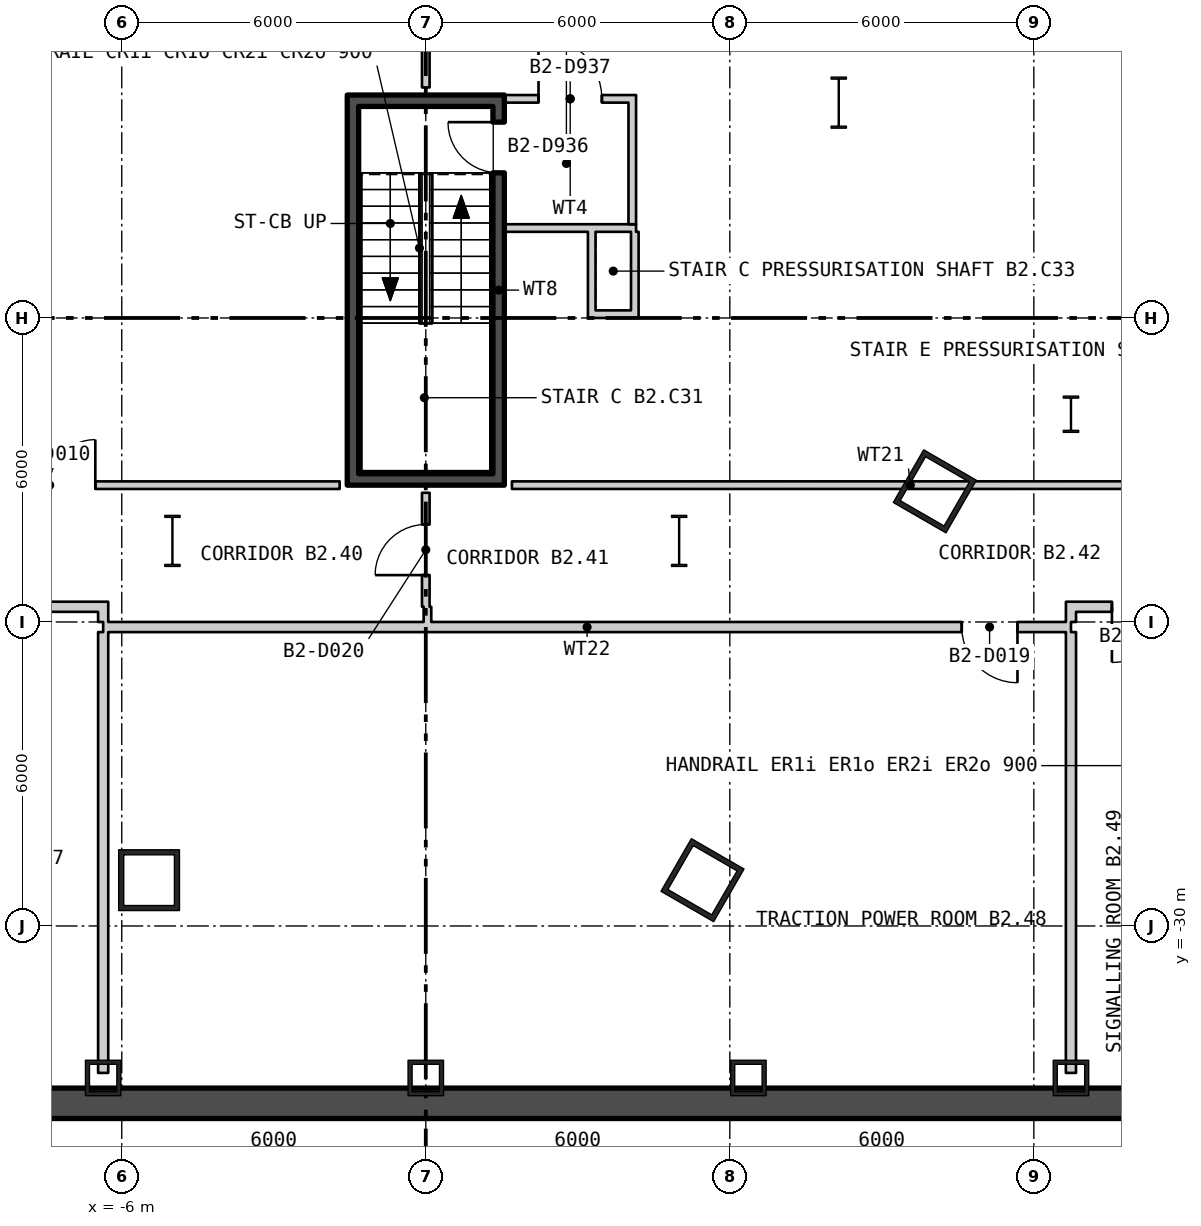
"""IFC4 building model, lengths in metres.
Left out: names, types, materials, properties, quantities, classifications, styles, units other than length and angle.
Written with IfcOpenShell. Run it as: python <this file> out.ifc"""

import sys

from ifc_helpers import new_model, si_unit, direction, frame, frame_2d, origin, origin_2d, place, context, subcontext, project, spatial, rectangle, hollow_rectangle, i_section, extrude, element, fill, save


model = new_model("IFC4")
c1 = context("Model", 3, precision=1e-05, world=origin(), true_north=direction((0.0, 1.0)))
c2 = subcontext(c1, "Body", "Model", "MODEL_VIEW")
j1 = project(units=[si_unit("LENGTHUNIT", "METRE"), si_unit("PLANEANGLEUNIT", "RADIAN")], contexts=[c1])
p1 = place(None, origin())
s1 = spatial("IfcSite", under=j1, at=p1, CompositionType="ELEMENT")
p2 = place(p1, origin())
s2 = spatial("IfcBuilding", under=s1, at=p2, CompositionType="ELEMENT")
p3 = place(p2, frame((0.0, 0.0, -11.4)))
s3 = spatial("IfcBuildingStorey", under=s2, at=p3, CompositionType="ELEMENT", Elevation=-11.4)
for number, where, z_axis, x_axis in (
    (1, (-5.461, -29.096, 0.0), (0.0, 0.0, 1.0), (1.0, 0.0, 0.0)),
    (2, (5.461, -29.096, 0.0), (0.0, 0.0, 1.0), (0.5, 0.866, 0.0)),
    (3, (10.046, -21.422, 0.0), (0.0, 0.0, 1.0), (0.5, 0.866, 0.0)),
):
    element("IfcColumn", number, at=place(p3, frame(where, z_axis=z_axis, x_axis=x_axis)), inside=s3, PredefinedType="COLUMN", context=c2, shape_type="SweptSolid", body=[
        extrude(hollow_rectangle(XDim=1.2, YDim=1.2, WallThickness=0.1, at=origin_2d()), origin(), (0.0, 0.0, 1.0), 5.7),
    ])
for number, where, z_axis, x_axis in (
    (4, (8.15, -13.75, 0.0), (0.0, 0.0, 1.0), (1.0, 0.0, 0.0)),
    (5, (5.0, -22.4, 0.0), (0.0, 0.0, 1.0), (1.0, 0.0, 0.0)),
    (6, (-5.0, -22.4, 0.0), (0.0, 0.0, 1.0), (1.0, 0.0, 0.0)),
):
    element("IfcColumn", number, at=place(p3, frame(where, z_axis=z_axis, x_axis=x_axis)), inside=s3, PredefinedType="COLUMN", context=c2, shape_type="SweptSolid", body=[
        extrude(i_section(OverallWidth=0.302, OverallDepth=1.008, WebThickness=0.021, FlangeThickness=0.04, at=origin_2d()), origin(), (0.0, 0.0, 1.0), 5.7),
    ])
for number, where, z_axis, x_axis in (
    (7, (-6.367, -33.0, 0.0), (0.0, 0.0, 1.0), (1.0, 0.0, 0.0)),
    (8, (0.0, -33.0, 0.0), (0.0, 0.0, 1.0), (1.0, 0.0, 0.0)),
    (9, (6.367, -33.0, 0.0), (0.0, 0.0, 1.0), (1.0, 0.0, 0.0)),
    (10, (12.733, -33.0, 0.0), (0.0, 0.0, 1.0), (1.0, 0.0, 0.0)),
):
    element("IfcColumn", number, at=place(p3, frame(where, z_axis=z_axis, x_axis=x_axis)), inside=s3, PredefinedType="COLUMN", context=c2, shape_type="SweptSolid", body=[
        extrude(hollow_rectangle(XDim=0.7, YDim=0.7, WallThickness=0.08, at=origin_2d()), origin(), (0.0, 0.0, 1.0), 5.7),
    ])
p4 = place(p3, frame((12.733, -19.9, 0.0), z_axis=(0.0, 0.0, 1.0), x_axis=(1.0, 0.0, 0.0)))
e11 = element("IfcColumn", 11, at=p4, inside=s3, PredefinedType="COLUMN", context=c2, shape_type="SweptSolid", body=[
    extrude(i_section(OverallWidth=0.304, OverallDepth=0.716, WebThickness=0.021, FlangeThickness=0.04, at=origin_2d()), origin(), (0.0, 0.0, 1.0), 5.7),
])
p5 = place(p3, frame((-39.0, -33.5, -0.4), z_axis=(0.0, 0.0, 1.0), x_axis=(1.0, 0.0, 0.0)))
e12 = element("IfcWall", 12, at=p5, inside=s3, PredefinedType="STANDARD", context=c2, shape_type="SweptSolid", body=[
    extrude(rectangle(XDim=78.0, YDim=0.6, at=frame_2d((39.0, 0.0))), origin(), (0.0, 0.0, 1.0), 5.7),
])
p6 = place(p3, frame((-1.438, -21.075, 0.0), z_axis=(0.0, 0.0, 1.0), x_axis=(0.0, 1.0, 0.0)))
e13 = element("IfcWall", 13, at=p6, inside=s3, PredefinedType="SHEAR", context=c2, shape_type="SweptSolid", body=[
    extrude(rectangle(XDim=7.25, YDim=0.225, at=frame_2d((3.625, 0.0))), origin(), (0.0, 0.0, 1.0), 5.25),
])
p7 = place(p3, frame((1.438, -21.075, 0.0), z_axis=(0.0, 0.0, 1.0), x_axis=(0.0, 1.0, 0.0)))
e14 = element("IfcWall", 14, at=p7, inside=s3, PredefinedType="SHEAR", context=c2, shape_type="SweptSolid", body=[
    extrude(rectangle(XDim=7.25, YDim=0.225, at=frame_2d((3.625, 0.0))), origin(), (0.0, 0.0, 1.0), 5.25),
])
p8 = place(p7, frame((5.94, 0.0, 0.0)))
e15 = element("IfcOpeningElement", 15, at=p8, cuts=e14, PredefinedType="OPENING", context=c2, shape_type="SweptSolid", body=[
    extrude(rectangle(XDim=1.0, YDim=2.1, at=frame_2d((0.5, 1.05))), frame((0.0, 0.122, 0.0), z_axis=(0.0, -1.0, 0.0), x_axis=(1.0, 0.0, 0.0)), (0.0, 0.0, 1.0), 0.245),
])
for number, where, z_axis, x_axis in (
    (16, (-1.55, -21.188, 0.0), (0.0, 0.0, 1.0), (1.0, 0.0, 0.0)),
    (17, (-1.55, -13.713, 0.0), (0.0, 0.0, 1.0), (1.0, 0.0, 0.0)),
):
    element("IfcWall", number, at=place(p3, frame(where, z_axis=z_axis, x_axis=x_axis)), inside=s3, PredefinedType="SHEAR", context=c2, shape_type="SweptSolid", body=[
        extrude(rectangle(XDim=3.1, YDim=0.225, at=frame_2d((1.55, 0.0))), origin(), (0.0, 0.0, 1.0), 5.25),
    ])
p9 = place(p3, frame((1.55, -16.225, 0.0), z_axis=(0.0, 0.0, 1.0), x_axis=(1.0, 0.0, 0.0)))
e18 = element("IfcWall", 18, at=p9, inside=s3, PredefinedType="PARTITIONING", context=c2, shape_type="SweptSolid", body=[
    extrude(rectangle(XDim=2.6, YDim=0.15, at=frame_2d((1.3, 0.0))), origin(), (0.0, 0.0, 1.0), 5.25),
])
p10 = place(p3, frame((4.075, -16.15, 0.0), z_axis=(0.0, 0.0, 1.0), x_axis=(0.0, 1.0, 0.0)))
e19 = element("IfcWall", 19, at=p10, inside=s3, PredefinedType="PARTITIONING", context=c2, shape_type="SweptSolid", body=[
    extrude(rectangle(XDim=2.4, YDim=0.15, at=frame_2d((1.2, 0.0))), origin(), (0.0, 0.0, 1.0), 5.25),
])
p11 = place(p3, frame((1.55, -13.675, 0.0), z_axis=(0.0, 0.0, 1.0), x_axis=(1.0, 0.0, 0.0)))
e20 = element("IfcWall", 20, at=p11, inside=s3, PredefinedType="PARTITIONING", context=c2, shape_type="SweptSolid", body=[
    extrude(rectangle(XDim=2.6, YDim=0.15, at=frame_2d((1.3, 0.0))), origin(), (0.0, 0.0, 1.0), 5.25),
])
p12 = place(p11, frame((0.675, 0.0, 0.0)))
e21 = element("IfcOpeningElement", 21, at=p12, cuts=e20, PredefinedType="OPENING", context=c2, shape_type="SweptSolid", body=[
    extrude(rectangle(XDim=1.25, YDim=2.1, at=frame_2d((0.625, 1.05))), frame((0.0, 0.085, 0.0), z_axis=(0.0, -1.0, 0.0), x_axis=(1.0, 0.0, 0.0)), (0.0, 0.0, 1.0), 0.17),
])
p13 = place(p3, frame((3.275, -18.0, 0.0), z_axis=(0.0, 0.0, 1.0), x_axis=(0.0, 1.0, 0.0)))
e22 = element("IfcWall", 22, at=p13, inside=s3, PredefinedType="PARTITIONING", context=c2, shape_type="SweptSolid", body=[
    extrude(rectangle(XDim=1.7, YDim=0.15, at=frame_2d((0.85, 0.0))), origin(), (0.0, 0.0, 1.0), 5.25),
])
p14 = place(p3, frame((3.35, -17.925, 0.0), z_axis=(0.0, 0.0, 1.0), x_axis=(1.0, 0.0, 0.0)))
e23 = element("IfcWall", 23, at=p14, inside=s3, PredefinedType="PARTITIONING", context=c2, shape_type="SweptSolid", body=[
    extrude(rectangle(XDim=0.7, YDim=0.15, at=frame_2d((0.35, 0.0))), origin(), (0.0, 0.0, 1.0), 5.25),
])
p15 = place(p3, frame((4.125, -18.0, 0.0), z_axis=(0.0, 0.0, 1.0), x_axis=(0.0, 1.0, 0.0)))
e24 = element("IfcWall", 24, at=p15, inside=s3, PredefinedType="PARTITIONING", context=c2, shape_type="SweptSolid", body=[
    extrude(rectangle(XDim=1.7, YDim=0.15, at=frame_2d((0.85, 0.0))), origin(), (0.0, 0.0, 1.0), 5.25),
])
p16 = place(p3, frame((-17.425, -21.3, 0.0), z_axis=(0.0, 0.0, 1.0), x_axis=(1.0, 0.0, 0.0)))
e25 = element("IfcWall", 25, at=p16, inside=s3, PredefinedType="PARTITIONING", context=c2, shape_type="SweptSolid", body=[
    extrude(rectangle(XDim=15.725, YDim=0.15, at=frame_2d((7.862, 0.0))), origin(), (0.0, 0.0, 1.0), 5.25),
])
p17 = place(p16, frame((9.103, 0.0, 0.0)))
e26 = element("IfcOpeningElement", 26, at=p17, cuts=e25, PredefinedType="OPENING", context=c2, shape_type="SweptSolid", body=[
    extrude(rectangle(XDim=1.8, YDim=2.1, at=frame_2d((0.9, 1.05))), frame((0.0, 0.085, 0.0), z_axis=(0.0, -1.0, 0.0), x_axis=(1.0, 0.0, 0.0)), (0.0, 0.0, 1.0), 0.17),
])
p18 = place(p3, frame((-12.633, -23.7, 0.0), z_axis=(0.0, 0.0, 1.0), x_axis=(1.0, 0.0, 0.0)))
e27 = element("IfcWall", 27, at=p18, inside=s3, PredefinedType="PARTITIONING", context=c2, shape_type="SweptSolid", body=[
    extrude(rectangle(XDim=6.166, YDim=0.2, at=frame_2d((3.083, 0.0))), origin(), (0.0, 0.0, 1.0), 5.25),
])
p19 = place(p18, frame((3.311, 0.0, 0.0)))
e28 = element("IfcOpeningElement", 28, at=p19, cuts=e27, PredefinedType="OPENING", context=c2, shape_type="SweptSolid", body=[
    extrude(rectangle(XDim=1.1, YDim=2.1, at=frame_2d((0.55, 1.05))), frame((0.0, 0.11, 0.0), z_axis=(0.0, -1.0, 0.0), x_axis=(1.0, 0.0, 0.0)), (0.0, 0.0, 1.0), 0.22),
])
p20 = place(p3, frame((-6.367, -32.9, 0.0), z_axis=(0.0, 0.0, 1.0), x_axis=(0.0, 1.0, 0.0)))
e29 = element("IfcWall", 29, at=p20, inside=s3, PredefinedType="PARTITIONING", context=c2, shape_type="SweptSolid", body=[
    extrude(rectangle(XDim=8.7, YDim=0.2, at=frame_2d((4.35, 0.0))), origin(), (0.0, 0.0, 1.0), 5.25),
])
p21 = place(p3, frame((-6.367, -24.1, 0.0), z_axis=(0.0, 0.0, 1.0), x_axis=(1.0, 0.0, 0.0)))
e30 = element("IfcWall", 30, at=p21, inside=s3, PredefinedType="PARTITIONING", context=c2, shape_type="SweptSolid", body=[
    extrude(rectangle(XDim=19.1, YDim=0.2, at=frame_2d((9.55, 0.0))), origin(), (0.0, 0.0, 1.0), 5.25),
])
p22 = place(p21, frame((16.944, 0.0, 0.0)))
e31 = element("IfcOpeningElement", 31, at=p22, cuts=e30, PredefinedType="OPENING", context=c2, shape_type="SweptSolid", body=[
    extrude(rectangle(XDim=1.1, YDim=2.1, at=frame_2d((0.55, 1.05))), frame((0.0, 0.11, 0.0), z_axis=(0.0, -1.0, 0.0), x_axis=(1.0, 0.0, 0.0)), (0.0, 0.0, 1.0), 0.22),
])
p23 = place(p3, frame((-6.367, -24.0, 0.0), z_axis=(0.0, 0.0, 1.0), x_axis=(0.0, 1.0, 0.0)))
e32 = element("IfcWall", 32, at=p23, inside=s3, PredefinedType="PARTITIONING", context=c2, shape_type="SweptSolid", body=[
    extrude(rectangle(XDim=0.4, YDim=0.2, at=frame_2d((0.2, 0.0))), origin(), (0.0, 0.0, 1.0), 5.25),
])
p24 = place(p3, frame((0.0, -23.7, 0.0), z_axis=(0.0, 0.0, 1.0), x_axis=(0.0, 1.0, 0.0)))
e33 = element("IfcWall", 33, at=p24, inside=s3, PredefinedType="PARTITIONING", context=c2, shape_type="SweptSolid", body=[
    extrude(rectangle(XDim=2.25, YDim=0.15, at=frame_2d((1.125, 0.0))), origin(), (0.0, 0.0, 1.0), 5.25),
])
p25 = place(p24, frame((0.625, 0.0, 0.0)))
e34 = element("IfcOpeningElement", 34, at=p25, cuts=e33, PredefinedType="OPENING", context=c2, shape_type="SweptSolid", body=[
    extrude(rectangle(XDim=1.0, YDim=2.1, at=frame_2d((0.5, 1.05))), frame((0.0, 0.085, 0.0), z_axis=(0.0, -1.0, 0.0), x_axis=(1.0, 0.0, 0.0)), (0.0, 0.0, 1.0), 0.17),
])
p26 = place(p3, frame((0.0, -13.45, 0.0), z_axis=(0.0, 0.0, 1.0), x_axis=(0.0, 1.0, 0.0)))
e35 = element("IfcWall", 35, at=p26, inside=s3, PredefinedType="PARTITIONING", context=c2, shape_type="SweptSolid", body=[
    extrude(rectangle(XDim=7.375, YDim=0.15, at=frame_2d((3.688, 0.0))), origin(), (0.0, 0.0, 1.0), 5.25),
])
p27 = place(p3, frame((0.033, -24.0, 0.0), z_axis=(0.0, 0.0, 1.0), x_axis=(0.0, 1.0, 0.0)))
e36 = element("IfcWall", 36, at=p27, inside=s3, PredefinedType="PARTITIONING", context=c2, shape_type="SweptSolid", body=[
    extrude(rectangle(XDim=0.3, YDim=0.15, at=frame_2d((0.15, 0.0))), origin(), (0.0, 0.0, 1.0), 5.25),
])
p28 = place(p3, frame((1.7, -21.3, 0.0), z_axis=(0.0, 0.0, 1.0), x_axis=(0.999999997978, 6.3593005e-05, 0.0)))
e37 = element("IfcWall", 37, at=p28, inside=s3, PredefinedType="PARTITIONING", context=c2, shape_type="SweptSolid", body=[
    extrude(rectangle(XDim=15.725, YDim=0.15, at=frame_2d((7.862, 0.0))), origin(), (0.0, 0.0, 1.0), 5.25),
])
p29 = place(p3, frame((12.732, -32.9, 0.0), z_axis=(0.0, 0.0, 1.0), x_axis=(0.000114942528, 0.999999993394, 0.0)))
e38 = element("IfcWall", 38, at=p29, inside=s3, PredefinedType="PARTITIONING", context=c2, shape_type="SweptSolid", body=[
    extrude(rectangle(XDim=8.7, YDim=0.2, at=frame_2d((4.35, 0.0))), origin(), (0.0, 0.0, 1.0), 5.25),
])
p30 = place(p3, frame((12.733, -24.0, 0.0), z_axis=(0.0, 0.0, 1.0), x_axis=(0.0, 1.0, 0.0)))
e39 = element("IfcWall", 39, at=p30, inside=s3, PredefinedType="PARTITIONING", context=c2, shape_type="SweptSolid", body=[
    extrude(rectangle(XDim=0.4, YDim=0.2, at=frame_2d((0.2, 0.0))), origin(), (0.0, 0.0, 1.0), 5.25),
])
p31 = place(p3, frame((12.833, -23.7, 0.0), z_axis=(0.0, 0.0, 1.0), x_axis=(1.0, 0.0, 0.0)))
e40 = element("IfcWall", 40, at=p31, inside=s3, PredefinedType="PARTITIONING", context=c2, shape_type="SweptSolid", body=[
    extrude(rectangle(XDim=2.517, YDim=0.2, at=frame_2d((1.258, 0.0))), origin(), (0.0, 0.0, 1.0), 5.25),
])
p32 = place(p31, frame((0.708, 0.0, 0.0)))
e41 = element("IfcOpeningElement", 41, at=p32, cuts=e40, PredefinedType="OPENING", context=c2, shape_type="SweptSolid", body=[
    extrude(rectangle(XDim=1.1, YDim=2.1, at=frame_2d((0.55, 1.05))), frame((0.0, 0.11, 0.0), z_axis=(0.0, -1.0, 0.0), x_axis=(1.0, 0.0, 0.0)), (0.0, 0.0, 1.0), 0.22),
])
p33 = place(p8, origin())
e42 = element("IfcDoor", 42, at=p33, inside=s3, OperationType="SINGLE_SWING_LEFT", PredefinedType="DOOR", context=c2, shape_type="SweptSolid", body=[
    extrude(rectangle(XDim=1.0, YDim=2.1, at=frame_2d((0.5, 1.05))), frame((0.0, 0.025, 0.0), z_axis=(0.0, -1.0, 0.0), x_axis=(1.0, 0.0, 0.0)), (0.0, 0.0, 1.0), 0.05),
])
fill(e15, e42)
p34 = place(p12, origin())
e43 = element("IfcDoor", 43, at=p34, inside=s3, OperationType="SINGLE_SWING_RIGHT", PredefinedType="DOOR", context=c2, shape_type="SweptSolid", body=[
    extrude(rectangle(XDim=1.25, YDim=2.1, at=frame_2d((0.625, 1.05))), frame((0.0, 0.025, 0.0), z_axis=(0.0, -1.0, 0.0), x_axis=(1.0, 0.0, 0.0)), (0.0, 0.0, 1.0), 0.05),
])
fill(e21, e43)
p35 = place(p17, origin())
e44 = element("IfcDoor", 44, at=p35, inside=s3, OperationType="DOUBLE_DOOR_SINGLE_SWING", PredefinedType="DOOR", context=c2, shape_type="SweptSolid", body=[
    extrude(rectangle(XDim=1.8, YDim=2.1, at=frame_2d((0.9, 1.05))), frame((0.0, 0.025, 0.0), z_axis=(0.0, -1.0, 0.0), x_axis=(1.0, 0.0, 0.0)), (0.0, 0.0, 1.0), 0.05),
])
fill(e26, e44)
p36 = place(p22, origin())
e45 = element("IfcDoor", 45, at=p36, inside=s3, OperationType="SINGLE_SWING_RIGHT", PredefinedType="DOOR", context=c2, shape_type="SweptSolid", body=[
    extrude(rectangle(XDim=1.1, YDim=2.1, at=frame_2d((0.55, 1.05))), frame((0.0, 0.025, 0.0), z_axis=(0.0, -1.0, 0.0), x_axis=(1.0, 0.0, 0.0)), (0.0, 0.0, 1.0), 0.05),
])
fill(e31, e45)
p37 = place(p25, origin())
e46 = element("IfcDoor", 46, at=p37, inside=s3, OperationType="SINGLE_SWING_RIGHT", PredefinedType="DOOR", context=c2, shape_type="SweptSolid", body=[
    extrude(rectangle(XDim=1.0, YDim=2.1, at=frame_2d((0.5, 1.05))), frame((0.0, 0.025, 0.0), z_axis=(0.0, -1.0, 0.0), x_axis=(1.0, 0.0, 0.0)), (0.0, 0.0, 1.0), 0.05),
])
fill(e34, e46)
p38 = place(p32, origin())
e47 = element("IfcDoor", 47, at=p38, inside=s3, OperationType="SINGLE_SWING_LEFT", PredefinedType="DOOR", context=c2, shape_type="SweptSolid", body=[
    extrude(rectangle(XDim=1.1, YDim=2.1, at=frame_2d((0.55, 1.05))), frame((0.0, 0.025, 0.0), z_axis=(0.0, -1.0, 0.0), x_axis=(1.0, 0.0, 0.0)), (0.0, 0.0, 1.0), 0.05),
])
fill(e41, e47)
save(model, sys.argv[1])
